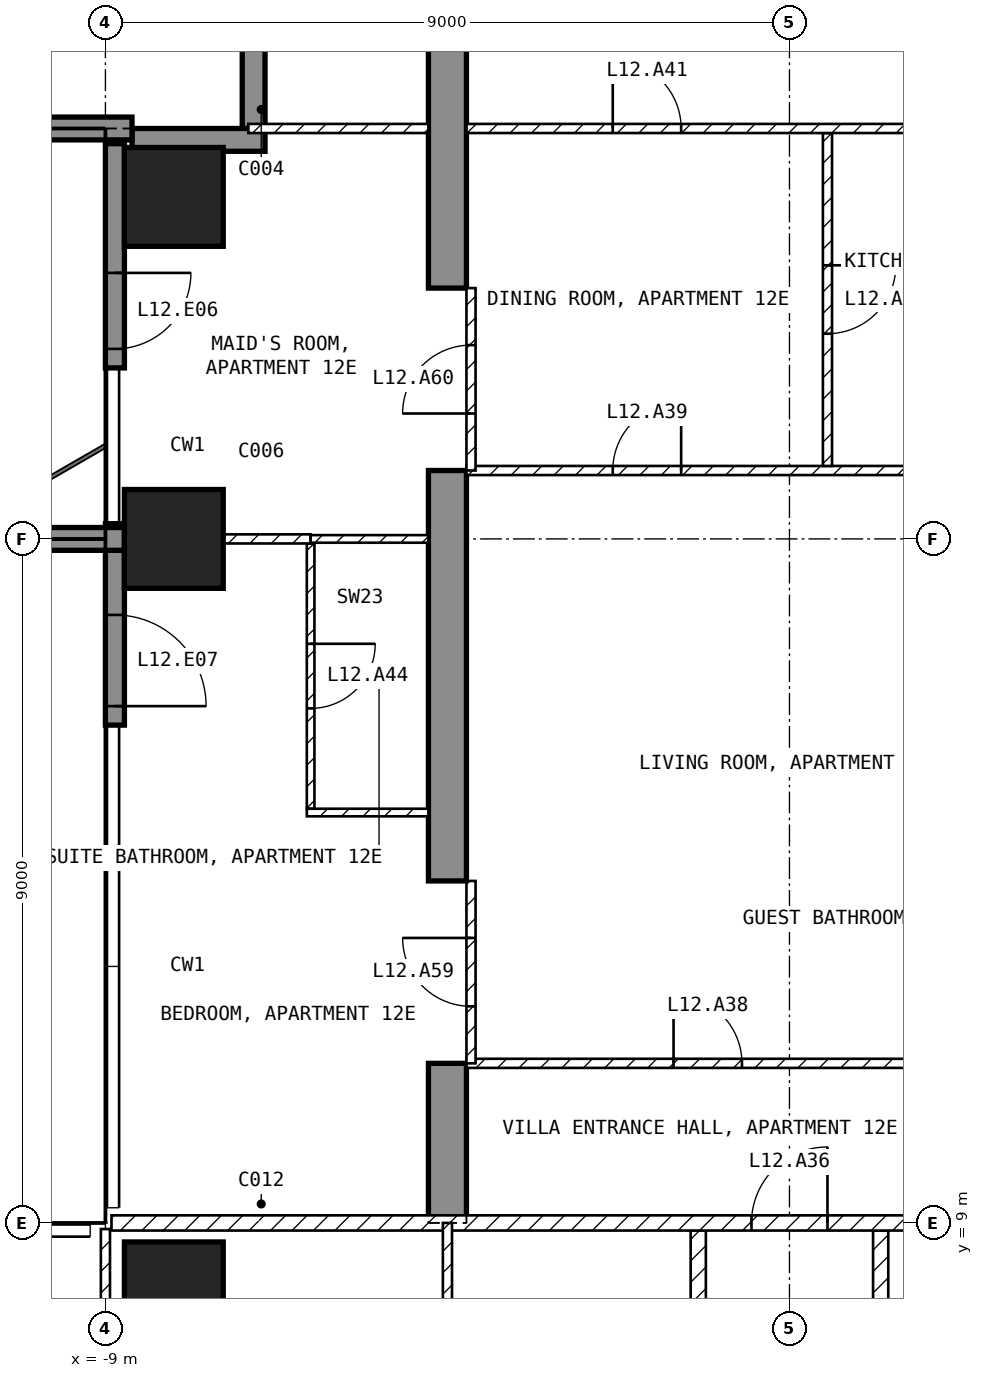
"""IFC4 building model, lengths in metres.
Left out: names, types, materials, properties, quantities, classifications, styles, units other than length and angle.
Written with IfcOpenShell. Run it as: python <this file> out.ifc"""

import sys

from ifc_helpers import new_model, si_unit, direction, frame, frame_2d, origin, origin_2d, place, context, subcontext, project, spatial, polyline, rectangle, outline, extrude, element, fill, save


model = new_model("IFC4")
c1 = context("Model", 3, precision=1e-05, world=origin(), true_north=direction((0.0, 1.0)))
c2 = subcontext(c1, "Body", "Model", "MODEL_VIEW")
j1 = project(units=[si_unit("LENGTHUNIT", "METRE"), si_unit("PLANEANGLEUNIT", "RADIAN")], contexts=[c1])
p1 = place(None, origin())
s1 = spatial("IfcSite", under=j1, at=p1, CompositionType="ELEMENT")
p2 = place(p1, origin())
s2 = spatial("IfcBuilding", under=s1, at=p2, CompositionType="ELEMENT")
p3 = place(p2, frame((0.0, 0.0, 61.0)))
s3 = spatial("IfcBuildingStorey", under=s2, at=p3, CompositionType="ELEMENT", Elevation=61.0)
for number, where, z_axis, x_axis in (
    (1, (-8.1, 8.1, -0.25), (0.0, 0.0, 1.0), (1.0, 0.0, 0.0)),
    (2, (-8.1, 18.0, -0.25), (0.0, 0.0, 1.0), (1.0, 0.0, 0.0)),
    (3, (-8.1, 22.5, -0.25), (0.0, 0.0, 1.0), (1.0, 0.0, 0.0)),
):
    element("IfcColumn", number, at=place(p3, frame(where, z_axis=z_axis, x_axis=x_axis)), inside=s3, PredefinedType="COLUMN", context=c2, shape_type="SweptSolid", body=[
        extrude(rectangle(XDim=1.3, YDim=1.3, at=origin_2d()), origin(), (0.0, 0.0, 1.0), 3.5),
    ])
p4 = place(p3, frame((-4.75, 9.0, -0.25), z_axis=(1.0, 0.0, 0.0), x_axis=(0.0, 1.0, 0.0)))
e4 = element("IfcWall", 4, at=p4, inside=s3, PredefinedType="SHEAR", context=c2, shape_type="SweptSolid", body=[
    extrude(outline(polyline([(0.0, 0.0), (2.1, 0.0), (2.1, 2.65), (4.5, 2.65), (4.5, 0.0), (9.9, 0.0), (9.9, 2.65), (12.3, 2.65), (12.3, 0.0), (16.45, 0.0), (16.45, 3.5), (0.0, 3.5), (0.0, 0.0)])), origin(), (0.0, 0.0, 1.0), 0.5),
])
p5 = place(p3, frame((-8.875, 23.2, 0.0), z_axis=(0.0, 0.0, 1.0), x_axis=(0.0, -1.0, 0.0)))
e5 = element("IfcWall", 5, at=p5, inside=s3, PredefinedType="SOLIDWALL", context=c2, shape_type="SweptSolid", body=[
    extrude(rectangle(XDim=2.95, YDim=0.25, at=frame_2d((1.475, 0.0))), origin(), (0.0, 0.0, 1.0), 3.25),
])
p6 = place(p5, frame((1.7, 0.0, 0.0)))
e6 = element("IfcOpeningElement", 6, at=p6, cuts=e5, PredefinedType="OPENING", context=c2, shape_type="SweptSolid", body=[
    extrude(rectangle(XDim=1.0, YDim=2.4, at=frame_2d((0.5, 1.2))), frame((0.0, 0.135, 0.0), z_axis=(0.0, -1.0, 0.0), x_axis=(1.0, 0.0, 0.0)), (0.0, 0.0, 1.0), 0.27),
])
p7 = place(p3, frame((-8.875, 18.2, 0.0), z_axis=(0.0, 0.0, 1.0), x_axis=(0.0, -1.0, 0.0)))
e7 = element("IfcWall", 7, at=p7, inside=s3, PredefinedType="SOLIDWALL", context=c2, shape_type="SweptSolid", body=[
    extrude(rectangle(XDim=2.65, YDim=0.25, at=frame_2d((1.325, 0.0))), origin(), (0.0, 0.0, 1.0), 3.25),
])
p8 = place(p7, frame((1.2, 0.0, 0.0)))
e8 = element("IfcOpeningElement", 8, at=p8, cuts=e7, PredefinedType="OPENING", context=c2, shape_type="SweptSolid", body=[
    extrude(rectangle(XDim=1.2, YDim=2.4, at=frame_2d((0.6, 1.2))), frame((0.0, 0.135, 0.0), z_axis=(0.0, -1.0, 0.0), x_axis=(1.0, 0.0, 0.0)), (0.0, 0.0, 1.0), 0.27),
])
p9 = place(p3, frame((-7.05, 25.2, 0.0), z_axis=(0.0, 0.0, 1.0), x_axis=(0.0, -1.0, 0.0)))
e9 = element("IfcWall", 9, at=p9, inside=s3, PredefinedType="SOLIDWALL", context=c2, shape_type="SweptSolid", body=[
    extrude(rectangle(XDim=1.8, YDim=0.3, at=frame_2d((0.9, 0.0))), origin(), (0.0, 0.0, 1.0), 3.25),
])
p10 = place(p3, frame((-6.9, 23.25, 0.0), z_axis=(0.0, 0.0, 1.0), x_axis=(-1.0, 0.0, 0.0)))
e10 = element("IfcWall", 10, at=p10, inside=s3, PredefinedType="SOLIDWALL", context=c2, shape_type="SweptSolid", body=[
    extrude(rectangle(XDim=1.75, YDim=0.3, at=frame_2d((0.875, 0.0))), origin(), (0.0, 0.0, 1.0), 3.25),
])
p11 = place(p3, frame((-8.75, 18.0, 0.0), z_axis=(0.0, 0.0, 1.0), x_axis=(-1.0, 0.0, 0.0)))
e11 = element("IfcWall", 11, at=p11, inside=s3, PredefinedType="SOLIDWALL", context=c2, shape_type="SweptSolid", body=[
    extrude(rectangle(XDim=2.95, YDim=0.3, at=frame_2d((1.475, 0.0))), origin(), (0.0, 0.0, 1.0), 3.25),
])
p12 = place(p3, frame((-8.65, 23.4, 0.0), z_axis=(0.0, 0.0, 1.0), x_axis=(-1.0, 0.0, 0.0)))
e12 = element("IfcWall", 12, at=p12, inside=s3, PredefinedType="SOLIDWALL", context=c2, shape_type="SweptSolid", body=[
    extrude(rectangle(XDim=3.05, YDim=0.3, at=frame_2d((1.525, 0.0))), origin(), (0.0, 0.0, 1.0), 3.25),
])
for number, where, z_axis, x_axis in (
    (13, (1.2, 8.9, 0.0), (0.0, 0.0, 1.0), (0.0, -1.0, 0.0)),
    (14, (-1.2, 1.3, 0.0), (0.0, 0.0, 1.0), (0.0, 1.0, 0.0)),
):
    element("IfcWall", number, at=place(p3, frame(where, z_axis=z_axis, x_axis=x_axis)), inside=s3, PredefinedType="PARTITIONING", context=c2, shape_type="SweptSolid", body=[
        extrude(rectangle(XDim=7.6, YDim=0.2, at=frame_2d((3.8, 0.0))), origin(), (0.0, 0.0, 1.0), 3.25),
    ])
p13 = place(p3, frame((-8.92, 9.0, 0.0), z_axis=(0.0, 0.0, 1.0), x_axis=(1.0, 0.0, 0.0)))
e15 = element("IfcWall", 15, at=p13, inside=s3, PredefinedType="PARTITIONING", context=c2, shape_type="SweptSolid", body=[
    extrude(rectangle(XDim=17.84, YDim=0.2, at=frame_2d((8.92, 0.0))), origin(), (0.0, 0.0, 1.0), 3.25),
])
p14 = place(p13, frame((8.42, 0.0, 0.0)))
e16 = element("IfcOpeningElement", 16, at=p14, cuts=e15, PredefinedType="OPENING", context=c2, shape_type="SweptSolid", body=[
    extrude(rectangle(XDim=1.0, YDim=2.1, at=frame_2d((0.5, 1.05))), frame((0.0, 0.11, 0.0), z_axis=(0.0, -1.0, 0.0), x_axis=(1.0, 0.0, 0.0)), (0.0, 0.0, 1.0), 0.22),
])
p15 = place(p3, frame((-9.0, 8.92, 0.0), z_axis=(0.0, 0.0, 1.0), x_axis=(0.0, -1.0, 0.0)))
e17 = element("IfcWall", 17, at=p15, inside=s3, PredefinedType="PARTITIONING", context=c2, shape_type="SweptSolid", body=[
    extrude(rectangle(XDim=7.62, YDim=0.12, at=frame_2d((3.81, 0.0))), origin(), (0.0, 0.0, 1.0), 3.25),
])
p16 = place(p15, frame((5.87, 0.0, 0.0)))
e18 = element("IfcOpeningElement", 18, at=p16, cuts=e17, PredefinedType="OPENING", context=c2, shape_type="SweptSolid", body=[
    extrude(rectangle(XDim=0.9, YDim=2.1, at=frame_2d((0.45, 1.05))), frame((0.0, 0.07, 0.0), z_axis=(0.0, -1.0, 0.0), x_axis=(1.0, 0.0, 0.0)), (0.0, 0.0, 1.0), 0.14),
])
p17 = place(p3, frame((-4.5, 9.0, 0.0), z_axis=(0.0, 0.0, 1.0), x_axis=(0.0, -1.0, 0.0)))
e19 = element("IfcWall", 19, at=p17, inside=s3, PredefinedType="PARTITIONING", context=c2, shape_type="SweptSolid", body=[
    extrude(rectangle(XDim=4.68, YDim=0.12, at=frame_2d((2.34, 0.0))), origin(), (0.0, 0.0, 1.0), 3.25),
])
p18 = place(p17, frame((1.89, 0.0, 0.0)))
e20 = element("IfcOpeningElement", 20, at=p18, cuts=e19, PredefinedType="OPENING", context=c2, shape_type="SweptSolid", body=[
    extrude(rectangle(XDim=0.9, YDim=2.1, at=frame_2d((0.45, 1.05))), frame((0.0, 0.07, 0.0), z_axis=(0.0, -1.0, 0.0), x_axis=(1.0, 0.0, 0.0)), (0.0, 0.0, 1.0), 0.14),
])
p19 = place(p3, frame((-4.25, 11.1, 0.0), z_axis=(0.0, 0.0, 1.0), x_axis=(1.0, 0.0, 0.0)))
e21 = element("IfcWall", 21, at=p19, inside=s3, PredefinedType="PARTITIONING", context=c2, shape_type="SweptSolid", body=[
    extrude(rectangle(XDim=6.35, YDim=0.12, at=frame_2d((3.175, 0.0))), origin(), (0.0, 0.0, 1.0), 3.25),
])
p20 = place(p19, frame((2.725, 0.0, 0.0)))
e22 = element("IfcOpeningElement", 22, at=p20, cuts=e21, PredefinedType="OPENING", context=c2, shape_type="SweptSolid", body=[
    extrude(rectangle(XDim=0.9, YDim=2.1, at=frame_2d((0.45, 1.05))), frame((0.0, 0.07, 0.0), z_axis=(0.0, -1.0, 0.0), x_axis=(1.0, 0.0, 0.0)), (0.0, 0.0, 1.0), 0.14),
])
p21 = place(p3, frame((-4.25, 18.9, 0.0), z_axis=(0.0, 0.0, 1.0), x_axis=(1.0, 0.0, 0.0)))
e23 = element("IfcWall", 23, at=p21, inside=s3, PredefinedType="PARTITIONING", context=c2, shape_type="SweptSolid", body=[
    extrude(rectangle(XDim=8.5, YDim=0.12, at=frame_2d((4.25, 0.0))), origin(), (0.0, 0.0, 1.0), 3.25),
])
p22 = place(p21, frame((1.925, 0.0, 0.0)))
e24 = element("IfcOpeningElement", 24, at=p22, cuts=e23, PredefinedType="OPENING", context=c2, shape_type="SweptSolid", body=[
    extrude(rectangle(XDim=0.9, YDim=2.1, at=frame_2d((0.45, 1.05))), frame((0.0, 0.07, 0.0), z_axis=(0.0, -1.0, 0.0), x_axis=(1.0, 0.0, 0.0)), (0.0, 0.0, 1.0), 0.14),
])
p23 = place(p3, frame((0.5, 23.34, 0.0), z_axis=(0.0, 0.0, 1.0), x_axis=(0.0, -1.0, 0.0)))
e25 = element("IfcWall", 25, at=p23, inside=s3, PredefinedType="PARTITIONING", context=c2, shape_type="SweptSolid", body=[
    extrude(rectangle(XDim=4.38, YDim=0.12, at=frame_2d((2.19, 0.0))), origin(), (0.0, 0.0, 1.0), 3.25),
])
p24 = place(p23, frame((1.74, 0.0, 0.0)))
e26 = element("IfcOpeningElement", 26, at=p24, cuts=e25, PredefinedType="OPENING", context=c2, shape_type="SweptSolid", body=[
    extrude(rectangle(XDim=0.9, YDim=2.1, at=frame_2d((0.45, 1.05))), frame((0.0, 0.07, 0.0), z_axis=(0.0, -1.0, 0.0), x_axis=(1.0, 0.0, 0.0)), (0.0, 0.0, 1.0), 0.14),
])
p25 = place(p3, frame((-4.25, 23.4, 0.0), z_axis=(0.0, 0.0, 1.0), x_axis=(1.0, 0.0, 0.0)))
e27 = element("IfcWall", 27, at=p25, inside=s3, PredefinedType="PARTITIONING", context=c2, shape_type="SweptSolid", body=[
    extrude(rectangle(XDim=8.5, YDim=0.12, at=frame_2d((4.25, 0.0))), origin(), (0.0, 0.0, 1.0), 3.25),
])
p26 = place(p25, frame((1.925, 0.0, 0.0)))
e28 = element("IfcOpeningElement", 28, at=p26, cuts=e27, PredefinedType="OPENING", context=c2, shape_type="SweptSolid", body=[
    extrude(rectangle(XDim=0.9, YDim=2.1, at=frame_2d((0.45, 1.05))), frame((0.0, 0.07, 0.0), z_axis=(0.0, -1.0, 0.0), x_axis=(1.0, 0.0, 0.0)), (0.0, 0.0, 1.0), 0.14),
])
p27 = place(p3, frame((-6.3, 17.94, 0.0), z_axis=(0.0, 0.0, 1.0), x_axis=(0.0, -1.0, 0.0)))
e29 = element("IfcWall", 29, at=p27, inside=s3, PredefinedType="PARTITIONING", context=c2, shape_type="SweptSolid", body=[
    extrude(rectangle(XDim=3.49, YDim=0.1, at=frame_2d((1.745, 0.0))), origin(), (0.0, 0.0, 1.0), 3.25),
])
p28 = place(p27, frame((1.32, 0.0, 0.0)))
e30 = element("IfcOpeningElement", 30, at=p28, cuts=e29, PredefinedType="OPENING", context=c2, shape_type="SweptSolid", body=[
    extrude(rectangle(XDim=0.85, YDim=2.1, at=frame_2d((0.425, 1.05))), frame((0.0, 0.06, 0.0), z_axis=(0.0, -1.0, 0.0), x_axis=(1.0, 0.0, 0.0)), (0.0, 0.0, 1.0), 0.12),
])
p29 = place(p3, frame((-6.35, 14.4, 0.0), z_axis=(0.0, 0.0, 1.0), x_axis=(1.0, 0.0, 0.0)))
e31 = element("IfcWall", 31, at=p29, inside=s3, PredefinedType="PARTITIONING", context=c2, shape_type="SweptSolid", body=[
    extrude(rectangle(XDim=1.6, YDim=0.1, at=frame_2d((0.8, 0.0))), origin(), (0.0, 0.0, 1.0), 3.25),
])
p30 = place(p3, frame((-7.45, 18.0, 0.0), z_axis=(0.0, 0.0, 1.0), x_axis=(1.0, 0.0, 0.0)))
e32 = element("IfcWall", 32, at=p30, inside=s3, PredefinedType="PARTITIONING", context=c2, shape_type="SweptSolid", body=[
    extrude(rectangle(XDim=1.15, YDim=0.12, at=frame_2d((0.575, 0.0))), origin(), (0.0, 0.0, 1.0), 2.346),
])
p31 = place(p3, frame((-6.3, 18.0, 0.0), z_axis=(0.0, 0.0, 1.0), x_axis=(1.0, 0.0, 0.0)))
e33 = element("IfcWall", 33, at=p31, inside=s3, PredefinedType="PARTITIONING", context=c2, shape_type="SweptSolid", body=[
    extrude(rectangle(XDim=1.55, YDim=0.1, at=frame_2d((0.775, 0.0))), origin(), (0.0, 0.0, 1.0), 2.346),
])
p32 = place(p3, frame((-7.12, 23.4, 0.0), z_axis=(0.0, 0.0, 1.0), x_axis=(1.0, 0.0, 0.0)))
e34 = element("IfcWall", 34, at=p32, inside=s3, PredefinedType="PARTITIONING", context=c2, shape_type="SweptSolid", body=[
    extrude(rectangle(XDim=2.37, YDim=0.12, at=frame_2d((1.185, 0.0))), origin(), (0.0, 0.0, 1.0), 3.25),
])
p33 = place(p3, frame((-4.19, 11.1, 0.0), z_axis=(0.0, 0.0, 1.0), x_axis=(0.0, 1.0, 0.0)))
e35 = element("IfcWall", 35, at=p33, inside=s3, PredefinedType="PARTITIONING", context=c2, shape_type="SweptSolid", body=[
    extrude(rectangle(XDim=2.4, YDim=0.12, at=frame_2d((1.2, 0.0))), origin(), (0.0, 0.0, 1.0), 2.4),
])
p34 = place(p33, frame((0.75, 0.0, 0.0)))
e36 = element("IfcOpeningElement", 36, at=p34, cuts=e35, PredefinedType="OPENING", context=c2, shape_type="SweptSolid", body=[
    extrude(rectangle(XDim=0.9, YDim=2.1, at=frame_2d((0.45, 1.05))), frame((0.0, 0.07, 0.0), z_axis=(0.0, -1.0, 0.0), x_axis=(1.0, 0.0, 0.0)), (0.0, 0.0, 1.0), 0.14),
])
p35 = place(p3, frame((-4.19, 18.9, 0.0), z_axis=(0.0, 0.0, 1.0), x_axis=(0.0, 1.0, 0.0)))
e37 = element("IfcWall", 37, at=p35, inside=s3, PredefinedType="PARTITIONING", context=c2, shape_type="SweptSolid", body=[
    extrude(rectangle(XDim=2.4, YDim=0.12, at=frame_2d((1.2, 0.0))), origin(), (0.0, 0.0, 1.0), 2.4),
])
p36 = place(p35, frame((0.75, 0.0, 0.0)))
e38 = element("IfcOpeningElement", 38, at=p36, cuts=e37, PredefinedType="OPENING", context=c2, shape_type="SweptSolid", body=[
    extrude(rectangle(XDim=0.9, YDim=2.1, at=frame_2d((0.45, 1.05))), frame((0.0, 0.07, 0.0), z_axis=(0.0, -1.0, 0.0), x_axis=(1.0, 0.0, 0.0)), (0.0, 0.0, 1.0), 0.14),
])
p37 = place(p6, origin())
e39 = element("IfcDoor", 39, at=p37, inside=s3, OperationType="SINGLE_SWING_LEFT", PredefinedType="DOOR", context=c2, shape_type="SweptSolid", body=[
    extrude(rectangle(XDim=1.0, YDim=2.4, at=frame_2d((0.5, 1.2))), frame((0.0, 0.025, 0.0), z_axis=(0.0, -1.0, 0.0), x_axis=(1.0, 0.0, 0.0)), (0.0, 0.0, 1.0), 0.05),
])
fill(e6, e39)
p38 = place(p8, origin())
e40 = element("IfcDoor", 40, at=p38, inside=s3, OperationType="SINGLE_SWING_RIGHT", PredefinedType="DOOR", context=c2, shape_type="SweptSolid", body=[
    extrude(rectangle(XDim=1.2, YDim=2.4, at=frame_2d((0.6, 1.2))), frame((0.0, 0.025, 0.0), z_axis=(0.0, -1.0, 0.0), x_axis=(1.0, 0.0, 0.0)), (0.0, 0.0, 1.0), 0.05),
])
fill(e8, e40)
p39 = place(p14, origin())
e41 = element("IfcDoor", 41, at=p39, inside=s3, OperationType="SINGLE_SWING_RIGHT", PredefinedType="DOOR", context=c2, shape_type="SweptSolid", body=[
    extrude(rectangle(XDim=1.0, YDim=2.1, at=frame_2d((0.5, 1.05))), frame((0.0, 0.025, 0.0), z_axis=(0.0, -1.0, 0.0), x_axis=(1.0, 0.0, 0.0)), (0.0, 0.0, 1.0), 0.05),
])
fill(e16, e41)
p40 = place(p20, origin())
e42 = element("IfcDoor", 42, at=p40, inside=s3, OperationType="SINGLE_SWING_LEFT", PredefinedType="DOOR", context=c2, shape_type="SweptSolid", body=[
    extrude(rectangle(XDim=0.9, YDim=2.1, at=frame_2d((0.45, 1.05))), frame((0.0, 0.025, 0.0), z_axis=(0.0, -1.0, 0.0), x_axis=(1.0, 0.0, 0.0)), (0.0, 0.0, 1.0), 0.05),
])
fill(e22, e42)
p41 = place(p22, origin())
e43 = element("IfcDoor", 43, at=p41, inside=s3, OperationType="SINGLE_SWING_RIGHT", PredefinedType="DOOR", context=c2, shape_type="SweptSolid", body=[
    extrude(rectangle(XDim=0.9, YDim=2.1, at=frame_2d((0.45, 1.05))), frame((0.0, 0.025, 0.0), z_axis=(0.0, -1.0, 0.0), x_axis=(1.0, 0.0, 0.0)), (0.0, 0.0, 1.0), 0.05),
])
fill(e24, e43)
p42 = place(p24, origin())
e44 = element("IfcDoor", 44, at=p42, inside=s3, OperationType="SINGLE_SWING_LEFT", PredefinedType="DOOR", context=c2, shape_type="SweptSolid", body=[
    extrude(rectangle(XDim=0.9, YDim=2.1, at=frame_2d((0.45, 1.05))), frame((0.0, 0.025, 0.0), z_axis=(0.0, -1.0, 0.0), x_axis=(1.0, 0.0, 0.0)), (0.0, 0.0, 1.0), 0.05),
])
fill(e26, e44)
p43 = place(p26, origin())
e45 = element("IfcDoor", 45, at=p43, inside=s3, OperationType="SINGLE_SWING_LEFT", PredefinedType="DOOR", context=c2, shape_type="SweptSolid", body=[
    extrude(rectangle(XDim=0.9, YDim=2.1, at=frame_2d((0.45, 1.05))), frame((0.0, 0.025, 0.0), z_axis=(0.0, -1.0, 0.0), x_axis=(1.0, 0.0, 0.0)), (0.0, 0.0, 1.0), 0.05),
])
fill(e28, e45)
p44 = place(p28, origin())
e46 = element("IfcDoor", 46, at=p44, inside=s3, OperationType="SINGLE_SWING_LEFT", PredefinedType="DOOR", context=c2, shape_type="SweptSolid", body=[
    extrude(rectangle(XDim=0.85, YDim=2.1, at=frame_2d((0.425, 1.05))), frame((0.0, 0.025, 0.0), z_axis=(0.0, -1.0, 0.0), x_axis=(1.0, 0.0, 0.0)), (0.0, 0.0, 1.0), 0.05),
])
fill(e30, e46)
p45 = place(p34, origin())
e47 = element("IfcDoor", 47, at=p45, inside=s3, OperationType="SINGLE_SWING_RIGHT", PredefinedType="DOOR", context=c2, shape_type="SweptSolid", body=[
    extrude(rectangle(XDim=0.9, YDim=2.1, at=frame_2d((0.45, 1.05))), frame((0.0, 0.025, 0.0), z_axis=(0.0, -1.0, 0.0), x_axis=(1.0, 0.0, 0.0)), (0.0, 0.0, 1.0), 0.05),
])
fill(e36, e47)
p46 = place(p36, origin())
e48 = element("IfcDoor", 48, at=p46, inside=s3, OperationType="SINGLE_SWING_LEFT", PredefinedType="DOOR", context=c2, shape_type="SweptSolid", body=[
    extrude(rectangle(XDim=0.9, YDim=2.1, at=frame_2d((0.45, 1.05))), frame((0.0, 0.025, 0.0), z_axis=(0.0, -1.0, 0.0), x_axis=(1.0, 0.0, 0.0)), (0.0, 0.0, 1.0), 0.05),
])
fill(e38, e48)
save(model, sys.argv[1])
